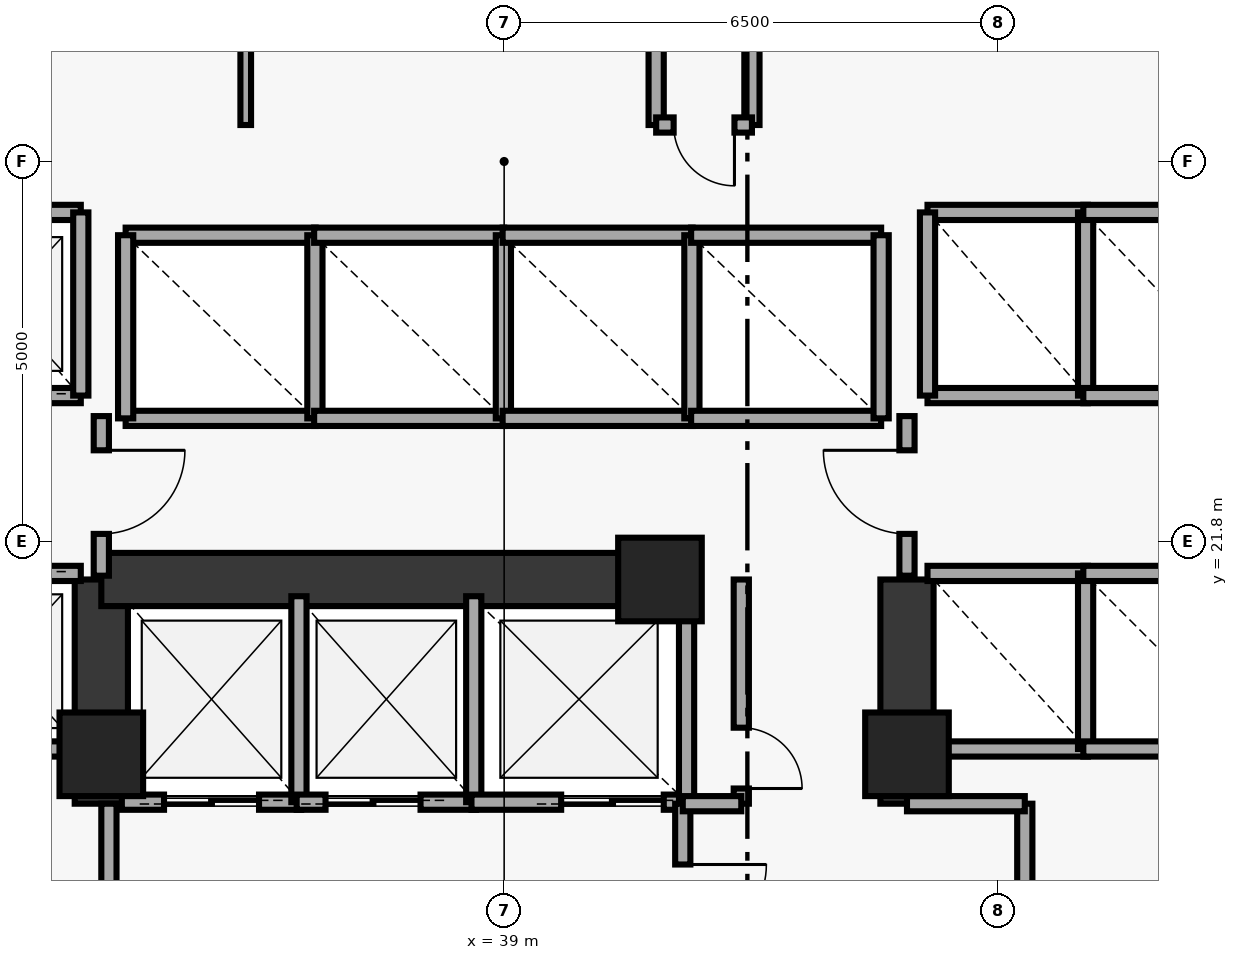
"""IFC4 building model, lengths in metres.
Left out: names, types, materials, properties, quantities, classifications, styles, units other than length and angle.
Written with IfcOpenShell. Run it as: python <this file> out.ifc"""

import sys

from ifc_helpers import new_model, si_unit, direction, frame, frame_2d, origin, origin_2d, place, context, subcontext, project, spatial, rectangle, extrude, element, fill, save


model = new_model("IFC4")
c1 = context("Model", 3, precision=1e-05, world=origin(), true_north=direction((0.0, 1.0)))
c2 = subcontext(c1, "Body", "Model", "MODEL_VIEW")
j1 = project(units=[si_unit("LENGTHUNIT", "METRE"), si_unit("PLANEANGLEUNIT", "RADIAN")], contexts=[c1])
p1 = place(None, origin())
s1 = spatial("IfcSite", under=j1, at=p1, CompositionType="ELEMENT")
p2 = place(p1, origin())
s2 = spatial("IfcBuilding", under=s1, at=p2, CompositionType="ELEMENT")
p3 = place(p2, frame((0.0, 0.0, 106.05)))
s3 = spatial("IfcBuildingStorey", under=s2, at=p3, CompositionType="ELEMENT", Elevation=106.05)
for number, where, z_axis, x_axis in (
    (1, (33.7, 19.0, 0.0), (0.0, 0.0, 1.0), (1.0, 0.0, 0.0)),
    (2, (41.05, 21.3, 0.0), (0.0, 0.0, 1.0), (1.0, 0.0, 0.0)),
    (3, (44.3, 19.0, 0.0), (0.0, 0.0, 1.0), (1.0, 0.0, 0.0)),
):
    element("IfcColumn", number, at=place(p3, frame(where, z_axis=z_axis, x_axis=x_axis)), inside=s3, PredefinedType="PILASTER", context=c2, shape_type="SweptSolid", body=[
        extrude(rectangle(XDim=1.1, YDim=1.1, at=origin_2d()), origin(), (0.0, 0.0, 1.0), 6.88),
    ])
for number, where, z_axis, x_axis in (
    (4, (33.7, 18.35, 0.0), (0.0, 0.0, 1.0), (0.0, 1.0, 0.0)),
    (5, (44.3, 18.35, 0.0), (0.0, 0.0, 1.0), (0.0, 1.0, 0.0)),
):
    element("IfcWall", number, at=place(p3, frame(where, z_axis=z_axis, x_axis=x_axis)), inside=s3, PredefinedType="SHEAR", context=c2, shape_type="SweptSolid", body=[
        extrude(rectangle(XDim=2.95, YDim=0.7, at=frame_2d((1.475, 0.0))), origin(), (0.0, 0.0, 1.0), 6.88),
    ])
p4 = place(p3, frame((33.7, 21.3, 0.0), z_axis=(0.0, 0.0, 1.0), x_axis=(1.0, 0.0, 0.0)))
e6 = element("IfcWall", 6, at=p4, inside=s3, PredefinedType="SHEAR", context=c2, shape_type="SweptSolid", body=[
    extrude(rectangle(XDim=7.55, YDim=0.7, at=frame_2d((3.775, 0.0))), origin(), (0.0, 0.0, 1.0), 6.88),
])
p5 = place(p3, frame((35.6, 27.28, 0.0), z_axis=(0.0, 0.0, 1.0), x_axis=(0.0, 1.0, 0.0)))
e7 = element("IfcWall", 7, at=p5, inside=s3, PredefinedType="PARTITIONING", context=c2, shape_type="SweptSolid", body=[
    extrude(rectangle(XDim=1.77, YDim=0.14, at=frame_2d((0.885, 0.0))), origin(), (0.0, 0.0, 1.0), 6.88),
])
for number, where, z_axis, x_axis in (
    (8, (41.0, 27.28, 0.0), (0.0, 0.0, 1.0), (0.0, 1.0, 0.0)),
    (9, (42.26, 27.28, 0.0), (0.0, 0.0, 1.0), (0.0, 1.0, 0.0)),
):
    element("IfcWall", number, at=place(p3, frame(where, z_axis=z_axis, x_axis=x_axis)), inside=s3, PredefinedType="SOLIDWALL", context=c2, shape_type="SweptSolid", body=[
        extrude(rectangle(XDim=1.77, YDim=0.2, at=frame_2d((0.885, 0.0))), origin(), (0.0, 0.0, 1.0), 6.88),
    ])
p6 = place(p3, frame((41.0, 27.28, 0.0), z_axis=(0.0, 0.0, 1.0), x_axis=(1.0, 0.0, 0.0)))
e10 = element("IfcWall", 10, at=p6, inside=s3, PredefinedType="SOLIDWALL", context=c2, shape_type="SweptSolid", body=[
    extrude(rectangle(XDim=1.26, YDim=0.2, at=frame_2d((0.63, 0.0))), origin(), (0.0, 0.0, 1.0), 6.88),
])
p7 = place(p6, frame((0.23, 0.0, 0.0)))
e11 = element("IfcOpeningElement", 11, at=p7, cuts=e10, PredefinedType="OPENING", context=c2, shape_type="SweptSolid", body=[
    extrude(rectangle(XDim=0.8, YDim=2.05, at=frame_2d((0.4, 1.025))), frame((0.0, 0.11, 0.0), z_axis=(0.0, -1.0, 0.0), x_axis=(1.0, 0.0, 0.0)), (0.0, 0.0, 1.0), 0.22),
])
p8 = place(p3, frame((31.32, 23.72, 0.0), z_axis=(0.0, 0.0, 1.0), x_axis=(1.0, 0.0, 0.0)))
e12 = element("IfcWall", 12, at=p8, inside=s3, PredefinedType="SOLIDWALL", context=c2, shape_type="SweptSolid", body=[
    extrude(rectangle(XDim=2.11, YDim=0.2, at=frame_2d((1.055, 0.0))), origin(), (0.0, 0.0, 1.0), 6.88),
])
p9 = place(p8, frame((0.505, 0.0, 0.0)))
e13 = element("IfcOpeningElement", 13, at=p9, cuts=e12, PredefinedType="OPENING", context=c2, shape_type="SweptSolid", body=[
    extrude(rectangle(XDim=1.1, YDim=2.15, at=frame_2d((0.55, 1.075))), frame((0.0, 0.11, 0.0), z_axis=(0.0, -1.0, 0.0), x_axis=(1.0, 0.0, 0.0)), (0.0, 0.0, 1.0), 0.22),
])
p10 = place(p3, frame((31.32, 26.13, 0.0), z_axis=(0.0, 0.0, 1.0), x_axis=(1.0, 0.0, 0.0)))
e14 = element("IfcWall", 14, at=p10, inside=s3, PredefinedType="SOLIDWALL", context=c2, shape_type="SweptSolid", body=[
    extrude(rectangle(XDim=2.11, YDim=0.2, at=frame_2d((1.055, 0.0))), origin(), (0.0, 0.0, 1.0), 6.88),
])
p11 = place(p3, frame((33.43, 23.72, 0.0), z_axis=(0.0, 0.0, 1.0), x_axis=(0.0, 1.0, 0.0)))
e15 = element("IfcWall", 15, at=p11, inside=s3, PredefinedType="SOLIDWALL", context=c2, shape_type="SweptSolid", body=[
    extrude(rectangle(XDim=2.41, YDim=0.2, at=frame_2d((1.205, 0.0))), origin(), (0.0, 0.0, 1.0), 6.88),
])
p12 = place(p3, frame((31.32, 19.07, 0.0), z_axis=(0.0, 0.0, 1.0), x_axis=(1.0, 0.0, 0.0)))
e16 = element("IfcWall", 16, at=p12, inside=s3, PredefinedType="SOLIDWALL", context=c2, shape_type="SweptSolid", body=[
    extrude(rectangle(XDim=2.11, YDim=0.2, at=frame_2d((1.055, 0.0))), origin(), (0.0, 0.0, 1.0), 6.88),
])
p13 = place(p3, frame((31.32, 21.38, 0.0), z_axis=(0.0, 0.0, 1.0), x_axis=(1.0, 0.0, 0.0)))
e17 = element("IfcWall", 17, at=p13, inside=s3, PredefinedType="SOLIDWALL", context=c2, shape_type="SweptSolid", body=[
    extrude(rectangle(XDim=2.11, YDim=0.2, at=frame_2d((1.055, 0.0))), origin(), (0.0, 0.0, 1.0), 6.88),
])
p14 = place(p13, frame((0.505, 0.0, 0.0)))
e18 = element("IfcOpeningElement", 18, at=p14, cuts=e17, PredefinedType="OPENING", context=c2, shape_type="SweptSolid", body=[
    extrude(rectangle(XDim=1.1, YDim=2.15, at=frame_2d((0.55, 1.075))), frame((0.0, 0.11, 0.0), z_axis=(0.0, -1.0, 0.0), x_axis=(1.0, 0.0, 0.0)), (0.0, 0.0, 1.0), 0.22),
])
for number, where, z_axis, x_axis in (
    (19, (44.57, 23.72, 0.0), (0.0, 0.0, 1.0), (1.0, 0.0, 0.0)),
    (20, (44.57, 26.13, 0.0), (0.0, 0.0, 1.0), (1.0, 0.0, 0.0)),
):
    element("IfcWall", number, at=place(p3, frame(where, z_axis=z_axis, x_axis=x_axis)), inside=s3, PredefinedType="SOLIDWALL", context=c2, shape_type="SweptSolid", body=[
        extrude(rectangle(XDim=2.11, YDim=0.2, at=frame_2d((1.055, 0.0))), origin(), (0.0, 0.0, 1.0), 6.88),
    ])
for number, where, z_axis, x_axis in (
    (21, (44.57, 23.72, 0.0), (0.0, 0.0, 1.0), (0.0, 1.0, 0.0)),
    (22, (46.65, 23.72, 0.0), (0.0, 0.0, 1.0), (0.0, 1.0, 0.0)),
):
    element("IfcWall", number, at=place(p3, frame(where, z_axis=z_axis, x_axis=x_axis)), inside=s3, PredefinedType="SOLIDWALL", context=c2, shape_type="SweptSolid", body=[
        extrude(rectangle(XDim=2.41, YDim=0.2, at=frame_2d((1.205, 0.0))), origin(), (0.0, 0.0, 1.0), 6.88),
    ])
for number, where, z_axis, x_axis in (
    (23, (46.62, 23.72, 0.0), (0.0, 0.0, 1.0), (1.0, 0.0, 0.0)),
    (24, (46.62, 26.13, 0.0), (0.0, 0.0, 1.0), (1.0, 0.0, 0.0)),
):
    element("IfcWall", number, at=place(p3, frame(where, z_axis=z_axis, x_axis=x_axis)), inside=s3, PredefinedType="SOLIDWALL", context=c2, shape_type="SweptSolid", body=[
        extrude(rectangle(XDim=2.31, YDim=0.2, at=frame_2d((1.155, 0.0))), origin(), (0.0, 0.0, 1.0), 6.88),
    ])
for number, where, z_axis, x_axis in (
    (25, (44.57, 19.07, 0.0), (0.0, 0.0, 1.0), (1.0, 0.0, 0.0)),
    (26, (44.57, 21.38, 0.0), (0.0, 0.0, 1.0), (1.0, 0.0, 0.0)),
):
    element("IfcWall", number, at=place(p3, frame(where, z_axis=z_axis, x_axis=x_axis)), inside=s3, PredefinedType="SOLIDWALL", context=c2, shape_type="SweptSolid", body=[
        extrude(rectangle(XDim=2.11, YDim=0.2, at=frame_2d((1.055, 0.0))), origin(), (0.0, 0.0, 1.0), 6.88),
    ])
for number, where, z_axis, x_axis in (
    (27, (46.65, 19.07, 0.0), (0.0, 0.0, 1.0), (0.0, 1.0, 0.0)),
    (28, (46.62, 19.07, 0.0), (0.0, 0.0, 1.0), (1.0, 0.0, 0.0)),
    (29, (46.62, 21.38, 0.0), (0.0, 0.0, 1.0), (1.0, 0.0, 0.0)),
):
    element("IfcWall", number, at=place(p3, frame(where, z_axis=z_axis, x_axis=x_axis)), inside=s3, PredefinedType="SOLIDWALL", context=c2, shape_type="SweptSolid", body=[
        extrude(rectangle(XDim=2.31, YDim=0.2, at=frame_2d((1.155, 0.0))), origin(), (0.0, 0.0, 1.0), 6.88),
    ])
for number, where, z_axis, x_axis in (
    (30, (34.02, 23.42, 0.0), (0.0, 0.0, 1.0), (1.0, 0.0, 0.0)),
    (31, (34.02, 25.83, 0.0), (0.0, 0.0, 1.0), (1.0, 0.0, 0.0)),
):
    element("IfcWall", number, at=place(p3, frame(where, z_axis=z_axis, x_axis=x_axis)), inside=s3, PredefinedType="SOLIDWALL", context=c2, shape_type="SweptSolid", body=[
        extrude(rectangle(XDim=2.5, YDim=0.2, at=frame_2d((1.25, 0.0))), origin(), (0.0, 0.0, 1.0), 6.88),
    ])
for number, where, z_axis, x_axis in (
    (32, (34.02, 23.42, 0.0), (0.0, 0.0, 1.0), (0.0, 1.0, 0.0)),
    (33, (36.51, 23.42, 0.0), (0.0, 0.0, 1.0), (0.0, 1.0, 0.0)),
):
    element("IfcWall", number, at=place(p3, frame(where, z_axis=z_axis, x_axis=x_axis)), inside=s3, PredefinedType="SOLIDWALL", context=c2, shape_type="SweptSolid", body=[
        extrude(rectangle(XDim=2.41, YDim=0.2, at=frame_2d((1.205, 0.0))), origin(), (0.0, 0.0, 1.0), 6.88),
    ])
for number, where, z_axis, x_axis in (
    (34, (36.5, 23.42, 0.0), (0.0, 0.0, 1.0), (1.0, 0.0, 0.0)),
    (35, (36.5, 25.83, 0.0), (0.0, 0.0, 1.0), (1.0, 0.0, 0.0)),
):
    element("IfcWall", number, at=place(p3, frame(where, z_axis=z_axis, x_axis=x_axis)), inside=s3, PredefinedType="SOLIDWALL", context=c2, shape_type="SweptSolid", body=[
        extrude(rectangle(XDim=2.5, YDim=0.2, at=frame_2d((1.25, 0.0))), origin(), (0.0, 0.0, 1.0), 6.88),
    ])
p15 = place(p3, frame((38.99, 23.42, 0.0), z_axis=(0.0, 0.0, 1.0), x_axis=(0.0, 1.0, 0.0)))
e36 = element("IfcWall", 36, at=p15, inside=s3, PredefinedType="SOLIDWALL", context=c2, shape_type="SweptSolid", body=[
    extrude(rectangle(XDim=2.41, YDim=0.2, at=frame_2d((1.205, 0.0))), origin(), (0.0, 0.0, 1.0), 6.88),
])
for number, where, z_axis, x_axis in (
    (37, (38.98, 23.42, 0.0), (0.0, 0.0, 1.0), (1.0, 0.0, 0.0)),
    (38, (38.98, 25.83, 0.0), (0.0, 0.0, 1.0), (1.0, 0.0, 0.0)),
):
    element("IfcWall", number, at=place(p3, frame(where, z_axis=z_axis, x_axis=x_axis)), inside=s3, PredefinedType="SOLIDWALL", context=c2, shape_type="SweptSolid", body=[
        extrude(rectangle(XDim=2.5, YDim=0.2, at=frame_2d((1.25, 0.0))), origin(), (0.0, 0.0, 1.0), 6.88),
    ])
p16 = place(p3, frame((41.47, 23.42, 0.0), z_axis=(0.0, 0.0, 1.0), x_axis=(0.0, 1.0, 0.0)))
e39 = element("IfcWall", 39, at=p16, inside=s3, PredefinedType="SOLIDWALL", context=c2, shape_type="SweptSolid", body=[
    extrude(rectangle(XDim=2.41, YDim=0.2, at=frame_2d((1.205, 0.0))), origin(), (0.0, 0.0, 1.0), 6.88),
])
for number, where, z_axis, x_axis in (
    (40, (41.46, 23.42, 0.0), (0.0, 0.0, 1.0), (1.0, 0.0, 0.0)),
    (41, (41.46, 25.83, 0.0), (0.0, 0.0, 1.0), (1.0, 0.0, 0.0)),
):
    element("IfcWall", number, at=place(p3, frame(where, z_axis=z_axis, x_axis=x_axis)), inside=s3, PredefinedType="SOLIDWALL", context=c2, shape_type="SweptSolid", body=[
        extrude(rectangle(XDim=2.5, YDim=0.2, at=frame_2d((1.25, 0.0))), origin(), (0.0, 0.0, 1.0), 6.88),
    ])
p17 = place(p3, frame((43.96, 23.42, 0.0), z_axis=(0.0, 0.0, 1.0), x_axis=(0.0, 1.0, 0.0)))
e42 = element("IfcWall", 42, at=p17, inside=s3, PredefinedType="SOLIDWALL", context=c2, shape_type="SweptSolid", body=[
    extrude(rectangle(XDim=2.41, YDim=0.2, at=frame_2d((1.205, 0.0))), origin(), (0.0, 0.0, 1.0), 6.88),
])
p18 = place(p3, frame((33.97, 18.37, 0.0), z_axis=(0.0, 0.0, 1.0), x_axis=(1.0, 0.0, 0.0)))
e43 = element("IfcWall", 43, at=p18, inside=s3, PredefinedType="SOLIDWALL", context=c2, shape_type="SweptSolid", body=[
    extrude(rectangle(XDim=2.36, YDim=0.2, at=frame_2d((1.18, 0.0))), origin(), (0.0, 0.0, 1.0), 6.88),
])
p19 = place(p18, frame((0.555, 0.0, 0.0)))
e44 = element("IfcOpeningElement", 44, at=p19, cuts=e43, PredefinedType="OPENING", context=c2, shape_type="SweptSolid", body=[
    extrude(rectangle(XDim=1.25, YDim=2.2, at=frame_2d((0.625, 1.1))), frame((0.0, 0.11, 0.0), z_axis=(0.0, -1.0, 0.0), x_axis=(1.0, 0.0, 0.0)), (0.0, 0.0, 1.0), 0.22),
])
p20 = place(p3, frame((36.3, 18.37, 0.0), z_axis=(0.0, 0.0, 1.0), x_axis=(0.0, 1.0, 0.0)))
e45 = element("IfcWall", 45, at=p20, inside=s3, PredefinedType="SOLIDWALL", context=c2, shape_type="SweptSolid", body=[
    extrude(rectangle(XDim=2.71, YDim=0.2, at=frame_2d((1.355, 0.0))), origin(), (0.0, 0.0, 1.0), 6.88),
])
p21 = place(p3, frame((36.27, 18.37, 0.0), z_axis=(0.0, 0.0, 1.0), x_axis=(1.0, 0.0, 0.0)))
e46 = element("IfcWall", 46, at=p21, inside=s3, PredefinedType="SOLIDWALL", context=c2, shape_type="SweptSolid", body=[
    extrude(rectangle(XDim=2.36, YDim=0.2, at=frame_2d((1.18, 0.0))), origin(), (0.0, 0.0, 1.0), 6.88),
])
p22 = place(p21, frame((0.38, 0.0, 0.0)))
e47 = element("IfcOpeningElement", 47, at=p22, cuts=e46, PredefinedType="OPENING", context=c2, shape_type="SweptSolid", body=[
    extrude(rectangle(XDim=1.25, YDim=2.2, at=frame_2d((0.625, 1.1))), frame((0.0, 0.11, 0.0), z_axis=(0.0, -1.0, 0.0), x_axis=(1.0, 0.0, 0.0)), (0.0, 0.0, 1.0), 0.22),
])
p23 = place(p3, frame((38.6, 18.37, 0.0), z_axis=(0.0, 0.0, 1.0), x_axis=(0.0, 1.0, 0.0)))
e48 = element("IfcWall", 48, at=p23, inside=s3, PredefinedType="SOLIDWALL", context=c2, shape_type="SweptSolid", body=[
    extrude(rectangle(XDim=2.71, YDim=0.2, at=frame_2d((1.355, 0.0))), origin(), (0.0, 0.0, 1.0), 6.88),
])
p24 = place(p3, frame((38.57, 18.37, 0.0), z_axis=(0.0, 0.0, 1.0), x_axis=(1.0, 0.0, 0.0)))
e49 = element("IfcWall", 49, at=p24, inside=s3, PredefinedType="SOLIDWALL", context=c2, shape_type="SweptSolid", body=[
    extrude(rectangle(XDim=2.83, YDim=0.2, at=frame_2d((1.415, 0.0))), origin(), (0.0, 0.0, 1.0), 6.88),
])
p25 = place(p24, frame((1.18, 0.0, 0.0)))
e50 = element("IfcOpeningElement", 50, at=p25, cuts=e49, PredefinedType="OPENING", context=c2, shape_type="SweptSolid", body=[
    extrude(rectangle(XDim=1.35, YDim=2.18, at=frame_2d((0.675, 1.09))), frame((0.0, 0.11, 0.0), z_axis=(0.0, -1.0, 0.0), x_axis=(1.0, 0.0, 0.0)), (0.0, 0.0, 1.0), 0.22),
])
p26 = place(p3, frame((41.4, 18.37, 0.0), z_axis=(0.0, 0.0, 1.0), x_axis=(0.0, 1.0, 0.0)))
e51 = element("IfcWall", 51, at=p26, inside=s3, PredefinedType="SOLIDWALL", context=c2, shape_type="SweptSolid", body=[
    extrude(rectangle(XDim=2.71, YDim=0.2, at=frame_2d((1.355, 0.0))), origin(), (0.0, 0.0, 1.0), 6.88),
])
p27 = place(p3, frame((33.7, 21.35, 0.0), z_axis=(0.0, 0.0, 1.0), x_axis=(0.0, 1.0, 0.0)))
e52 = element("IfcWall", 52, at=p27, inside=s3, PredefinedType="SOLIDWALL", context=c2, shape_type="SweptSolid", body=[
    extrude(rectangle(XDim=2.1, YDim=0.2, at=frame_2d((1.05, 0.0))), origin(), (0.0, 0.0, 1.0), 6.265),
])
p28 = place(p27, frame((0.55, 0.0, 0.0)))
e53 = element("IfcOpeningElement", 53, at=p28, cuts=e52, PredefinedType="OPENING", context=c2, shape_type="SweptSolid", body=[
    extrude(rectangle(XDim=1.1, YDim=2.15, at=frame_2d((0.55, 1.075))), frame((0.0, 0.11, 0.0), z_axis=(0.0, -1.0, 0.0), x_axis=(1.0, 0.0, 0.0)), (0.0, 0.0, 1.0), 0.22),
])
p29 = place(p3, frame((44.3, 21.35, 0.0), z_axis=(0.0, 0.0, 1.0), x_axis=(0.0, 1.0, 0.0)))
e54 = element("IfcWall", 54, at=p29, inside=s3, PredefinedType="SOLIDWALL", context=c2, shape_type="SweptSolid", body=[
    extrude(rectangle(XDim=2.1, YDim=0.2, at=frame_2d((1.05, 0.0))), origin(), (0.0, 0.0, 1.0), 6.265),
])
p30 = place(p29, frame((0.55, 0.0, 0.0)))
e55 = element("IfcOpeningElement", 55, at=p30, cuts=e54, PredefinedType="OPENING", context=c2, shape_type="SweptSolid", body=[
    extrude(rectangle(XDim=1.1, YDim=2.15, at=frame_2d((0.55, 1.075))), frame((0.0, 0.11, 0.0), z_axis=(0.0, -1.0, 0.0), x_axis=(1.0, 0.0, 0.0)), (0.0, 0.0, 1.0), 0.22),
])
p31 = place(p3, frame((33.8, 15.55, 0.0), z_axis=(0.0, 0.0, 1.0), x_axis=(0.0, 1.0, 0.0)))
e56 = element("IfcWall", 56, at=p31, inside=s3, PredefinedType="SOLIDWALL", context=c2, shape_type="SweptSolid", body=[
    extrude(rectangle(XDim=2.8, YDim=0.2, at=frame_2d((1.4, 0.0))), origin(), (0.0, 0.0, 1.0), 6.88),
])
p32 = place(p3, frame((41.35, 15.55, 0.0), z_axis=(0.0, 0.0, 1.0), x_axis=(0.0, 1.0, 0.0)))
e57 = element("IfcWall", 57, at=p32, inside=s3, PredefinedType="SOLIDWALL", context=c2, shape_type="SweptSolid", body=[
    extrude(rectangle(XDim=2.8, YDim=0.2, at=frame_2d((1.4, 0.0))), origin(), (0.0, 0.0, 1.0), 6.88),
])
p33 = place(p32, frame((0.9, 0.0, 0.0)))
e58 = element("IfcOpeningElement", 58, at=p33, cuts=e57, PredefinedType="OPENING", context=c2, shape_type="SweptSolid", body=[
    extrude(rectangle(XDim=1.1, YDim=2.15, at=frame_2d((0.55, 1.075))), frame((0.0, 0.11, 0.0), z_axis=(0.0, -1.0, 0.0), x_axis=(1.0, 0.0, 0.0)), (0.0, 0.0, 1.0), 0.22),
])
p34 = place(p3, frame((45.85, 16.05, 0.0), z_axis=(0.0, 0.0, 1.0), x_axis=(0.0, 1.0, 0.0)))
e59 = element("IfcWall", 59, at=p34, inside=s3, PredefinedType="SOLIDWALL", context=c2, shape_type="SweptSolid", body=[
    extrude(rectangle(XDim=2.3, YDim=0.2, at=frame_2d((1.15, 0.0))), origin(), (0.0, 0.0, 1.0), 6.88),
])
p35 = place(p3, frame((44.3, 18.35, 0.0), z_axis=(0.0, 0.0, 1.0), x_axis=(1.0, 0.0, 0.0)))
e60 = element("IfcWall", 60, at=p35, inside=s3, PredefinedType="SOLIDWALL", context=c2, shape_type="SweptSolid", body=[
    extrude(rectangle(XDim=1.55, YDim=0.2, at=frame_2d((0.775, 0.0))), origin(), (0.0, 0.0, 1.0), 6.88),
])
p36 = place(p3, frame((42.12, 18.35, 0.0), z_axis=(0.0, 0.0, 1.0), x_axis=(0.0, 1.0, 0.0)))
e61 = element("IfcWall", 61, at=p36, inside=s3, PredefinedType="SOLIDWALL", context=c2, shape_type="SweptSolid", body=[
    extrude(rectangle(XDim=2.95, YDim=0.2, at=frame_2d((1.475, 0.0))), origin(), (0.0, 0.0, 1.0), 6.88),
])
p37 = place(p36, frame((0.2, 0.0, 0.0)))
e62 = element("IfcOpeningElement", 62, at=p37, cuts=e61, PredefinedType="OPENING", context=c2, shape_type="SweptSolid", body=[
    extrude(rectangle(XDim=0.8, YDim=2.05, at=frame_2d((0.4, 1.025))), frame((0.0, 0.11, 0.0), z_axis=(0.0, -1.0, 0.0), x_axis=(1.0, 0.0, 0.0)), (0.0, 0.0, 1.0), 0.22),
])
p38 = place(p3, frame((41.35, 18.35, 0.0), z_axis=(0.0, 0.0, 1.0), x_axis=(1.0, 0.0, 0.0)))
e63 = element("IfcWall", 63, at=p38, inside=s3, PredefinedType="SOLIDWALL", context=c2, shape_type="SweptSolid", body=[
    extrude(rectangle(XDim=0.77, YDim=0.2, at=frame_2d((0.385, 0.0))), origin(), (0.0, 0.0, 1.0), 6.88),
])
p39 = place(p7, origin())
e64 = element("IfcDoor", 64, at=p39, inside=s3, OperationType="SINGLE_SWING_RIGHT", PredefinedType="DOOR", context=c2, shape_type="SweptSolid", body=[
    extrude(rectangle(XDim=0.8, YDim=2.05, at=frame_2d((0.4, 1.025))), frame((0.0, 0.025, 0.0), z_axis=(0.0, -1.0, 0.0), x_axis=(1.0, 0.0, 0.0)), (0.0, 0.0, 1.0), 0.05),
])
fill(e11, e64)
p40 = place(p19, origin())
e65 = element("IfcDoor", 65, at=p40, inside=s3, OperationType="DOUBLE_DOOR_SLIDING", PredefinedType="DOOR", context=c2, shape_type="SweptSolid", body=[
    extrude(rectangle(XDim=1.25, YDim=2.2, at=frame_2d((0.625, 1.1))), frame((0.0, 0.025, 0.0), z_axis=(0.0, -1.0, 0.0), x_axis=(1.0, 0.0, 0.0)), (0.0, 0.0, 1.0), 0.05),
])
fill(e44, e65)
p41 = place(p22, origin())
e66 = element("IfcDoor", 66, at=p41, inside=s3, OperationType="DOUBLE_DOOR_SLIDING", PredefinedType="DOOR", context=c2, shape_type="SweptSolid", body=[
    extrude(rectangle(XDim=1.25, YDim=2.2, at=frame_2d((0.625, 1.1))), frame((0.0, 0.025, 0.0), z_axis=(0.0, -1.0, 0.0), x_axis=(1.0, 0.0, 0.0)), (0.0, 0.0, 1.0), 0.05),
])
fill(e47, e66)
p42 = place(p25, origin())
e67 = element("IfcDoor", 67, at=p42, inside=s3, OperationType="DOUBLE_DOOR_SLIDING", PredefinedType="DOOR", context=c2, shape_type="SweptSolid", body=[
    extrude(rectangle(XDim=1.35, YDim=2.18, at=frame_2d((0.675, 1.09))), frame((0.0, 0.025, 0.0), z_axis=(0.0, -1.0, 0.0), x_axis=(1.0, 0.0, 0.0)), (0.0, 0.0, 1.0), 0.05),
])
fill(e50, e67)
p43 = place(p28, origin())
e68 = element("IfcDoor", 68, at=p43, inside=s3, OperationType="SINGLE_SWING_RIGHT", PredefinedType="DOOR", context=c2, shape_type="SweptSolid", body=[
    extrude(rectangle(XDim=1.1, YDim=2.15, at=frame_2d((0.55, 1.075))), frame((0.0, 0.025, 0.0), z_axis=(0.0, -1.0, 0.0), x_axis=(1.0, 0.0, 0.0)), (0.0, 0.0, 1.0), 0.05),
])
fill(e53, e68)
p44 = place(p30, origin())
e69 = element("IfcDoor", 69, at=p44, inside=s3, OperationType="SINGLE_SWING_RIGHT", PredefinedType="DOOR", context=c2, shape_type="SweptSolid", body=[
    extrude(rectangle(XDim=1.1, YDim=2.15, at=frame_2d((0.55, 1.075))), frame((0.0, 0.025, 0.0), z_axis=(0.0, -1.0, 0.0), x_axis=(1.0, 0.0, 0.0)), (0.0, 0.0, 1.0), 0.05),
])
fill(e55, e69)
p45 = place(p33, origin())
e70 = element("IfcDoor", 70, at=p45, inside=s3, OperationType="SINGLE_SWING_RIGHT", PredefinedType="DOOR", context=c2, shape_type="SweptSolid", body=[
    extrude(rectangle(XDim=1.1, YDim=2.15, at=frame_2d((0.55, 1.075))), frame((0.0, 0.025, 0.0), z_axis=(0.0, -1.0, 0.0), x_axis=(1.0, 0.0, 0.0)), (0.0, 0.0, 1.0), 0.05),
])
fill(e58, e70)
p46 = place(p37, origin())
e71 = element("IfcDoor", 71, at=p46, inside=s3, OperationType="SINGLE_SWING_LEFT", PredefinedType="DOOR", context=c2, shape_type="SweptSolid", body=[
    extrude(rectangle(XDim=0.8, YDim=2.05, at=frame_2d((0.4, 1.025))), frame((0.0, 0.025, 0.0), z_axis=(0.0, -1.0, 0.0), x_axis=(1.0, 0.0, 0.0)), (0.0, 0.0, 1.0), 0.05),
])
fill(e62, e71)
save(model, sys.argv[1])
